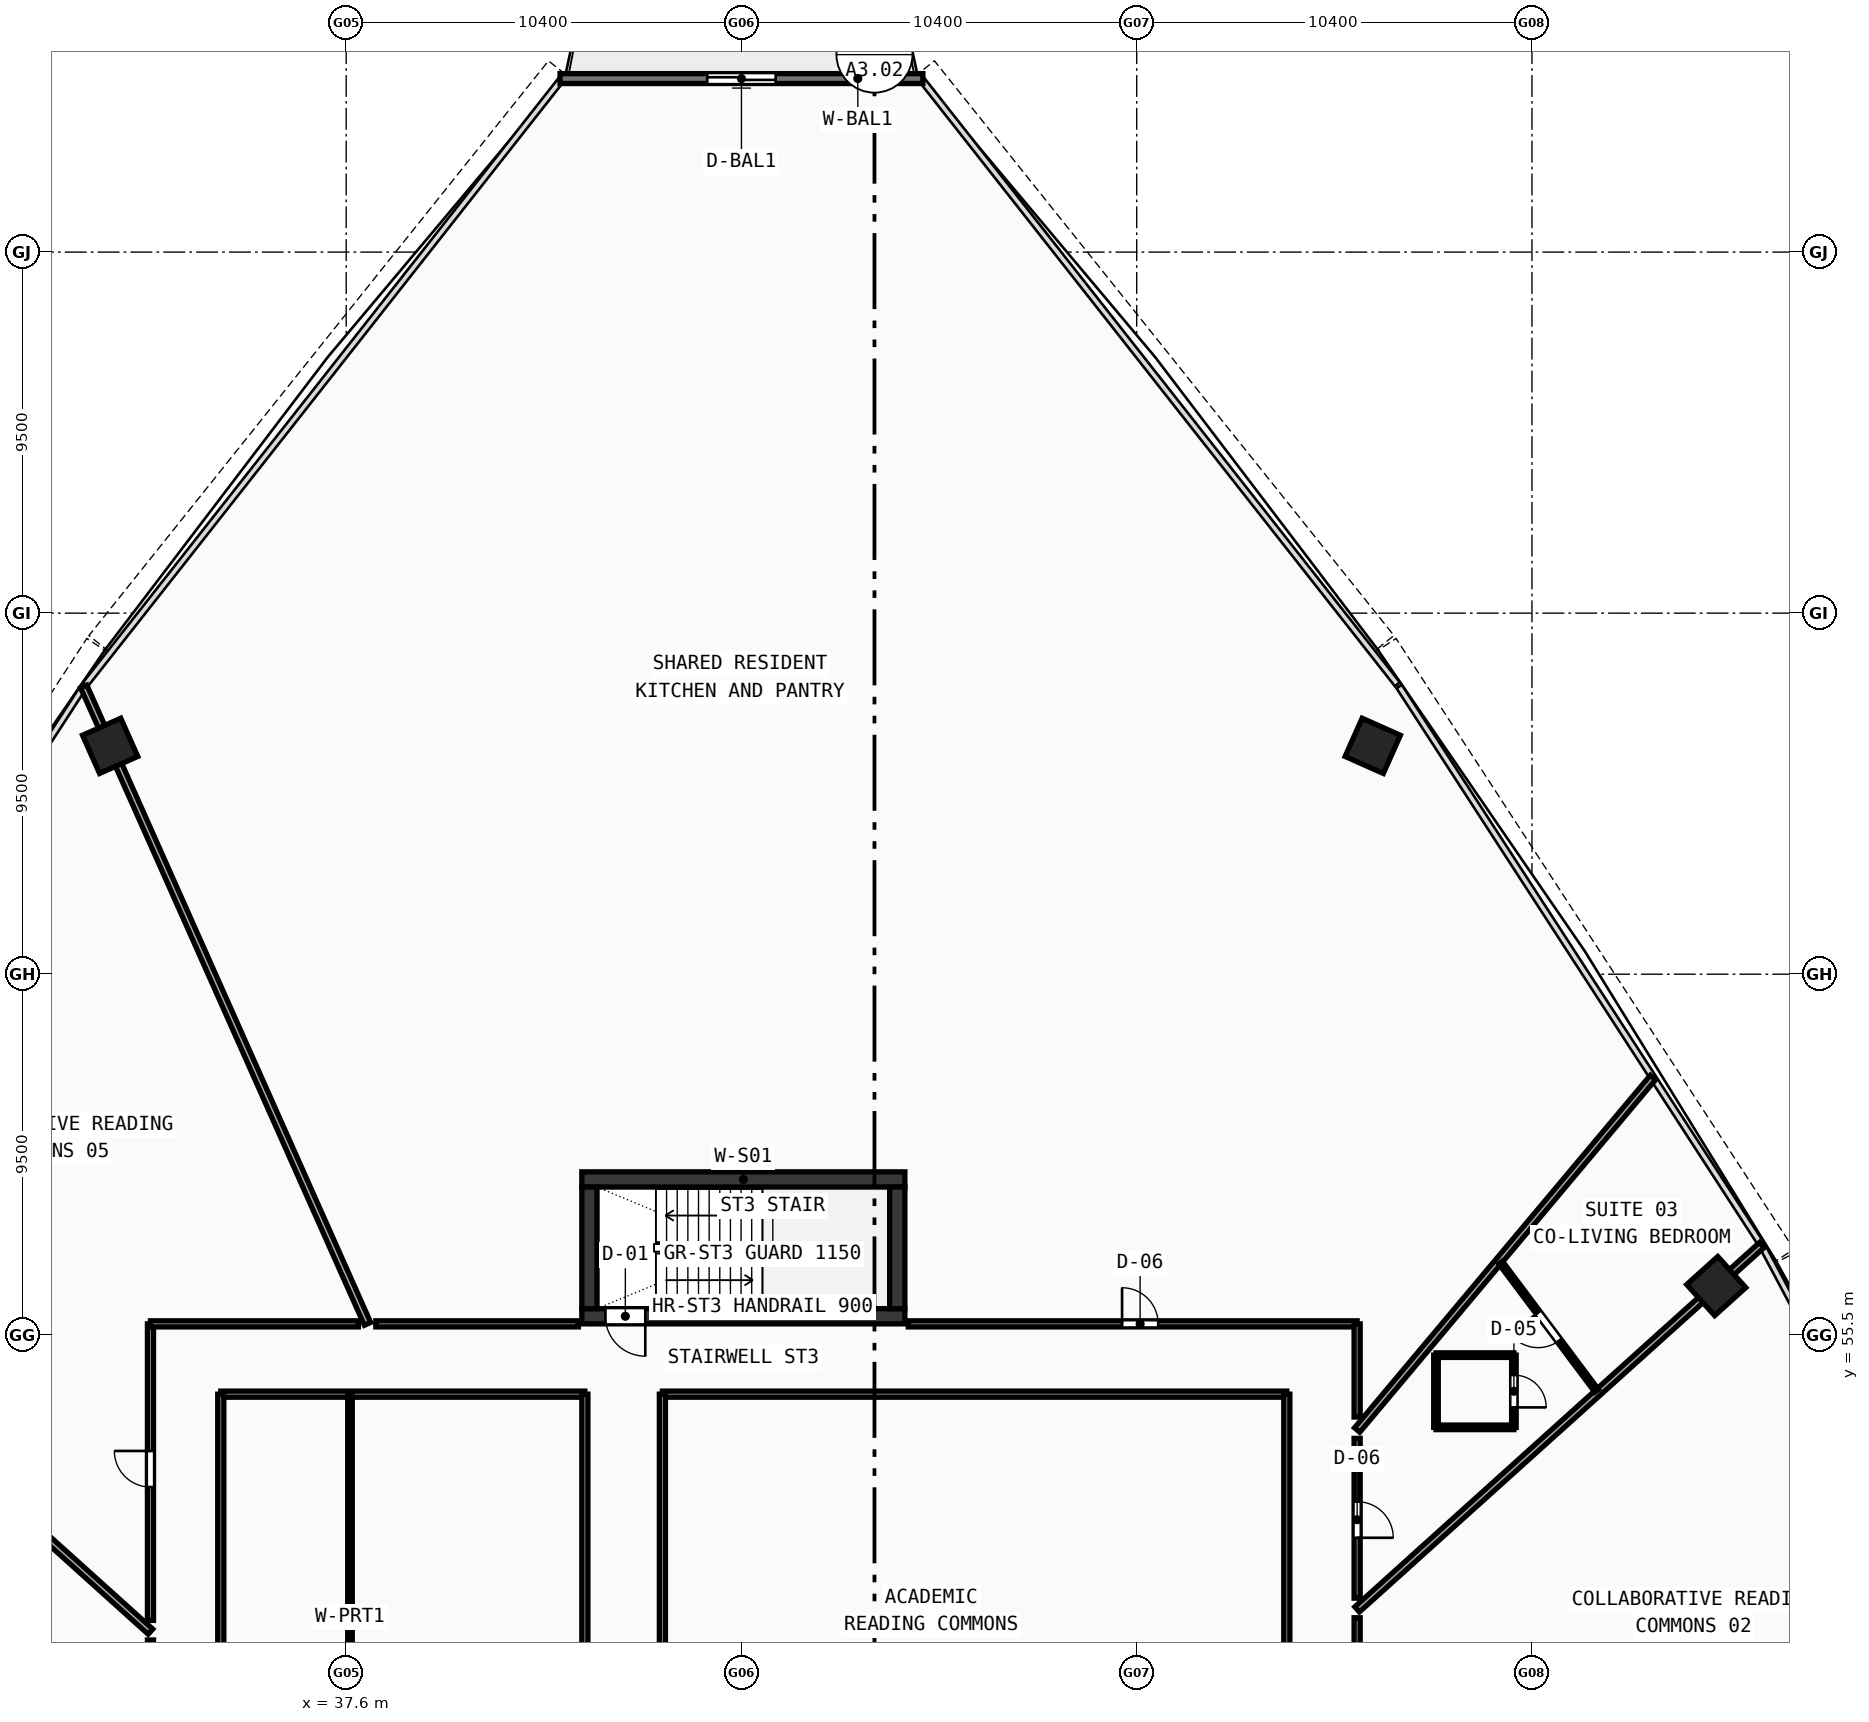
"""IFC4 building model, lengths in metres.
Left out: names, types, materials, properties, quantities, classifications, styles, units other than length and angle.
Written with IfcOpenShell. Run it as: python <this file> out.ifc"""

import sys

from ifc_helpers import new_model, si_unit, direction, frame, frame_2d, origin, origin_with_axes, origin_2d, place, context, subcontext, project, spatial, rectangle, hollow_rectangle, extrude, source, transform, mapped, element, fill, save


model = new_model("IFC4")
c1 = context("Model", 3, precision=1e-05, world=origin(), true_north=direction((0.0, 1.0)))
c2 = subcontext(c1, "Body", "Model", "MODEL_VIEW")
j1 = project(units=[si_unit("LENGTHUNIT", "METRE"), si_unit("PLANEANGLEUNIT", "RADIAN")], contexts=[c1])
p1 = place(None, origin())
s1 = spatial("IfcSite", under=j1, at=p1, CompositionType="ELEMENT")
p2 = place(p1, origin())
s2 = spatial("IfcBuilding", under=s1, at=p2, CompositionType="ELEMENT")
p3 = place(p2, frame((0.0, 0.0, 48.55)))
s3 = spatial("IfcBuildingStorey", under=s2, at=p3, CompositionType="ELEMENT", Elevation=48.55)
p4 = place(p3, frame((43.8, 59.6, 0.0), z_axis=(0.0, 0.0, 1.0), x_axis=(1.0, 0.0, 0.0)))
e1 = element("IfcWall", 1, at=p4, inside=s3, PredefinedType="SHEAR", context=c2, shape_type="SweptSolid", body=[
    extrude(rectangle(XDim=8.5, YDim=0.4, at=frame_2d((4.25, 0.0))), origin(), (0.0, 0.0, 1.0), 3.37),
])
p5 = place(p3, frame((43.8, 56.0, 0.0), z_axis=(0.0, 0.0, 1.0), x_axis=(1.0, 0.0, 0.0)))
e2 = element("IfcWall", 2, at=p5, inside=s3, PredefinedType="SHEAR", context=c2, shape_type="SweptSolid", body=[
    extrude(rectangle(XDim=8.5, YDim=0.4, at=frame_2d((4.25, 0.0))), origin(), (0.0, 0.0, 1.0), 3.37),
])
p6 = place(p5, frame((0.62, 0.0, 0.0)))
e3 = element("IfcOpeningElement", 3, at=p6, cuts=e2, PredefinedType="OPENING", context=c2, shape_type="SweptSolid", body=[
    extrude(rectangle(XDim=1.05, YDim=2.1, at=frame_2d((0.525, 1.05))), frame((0.0, 0.21, 0.0), z_axis=(0.0, -1.0, 0.0), x_axis=(1.0, 0.0, 0.0)), (0.0, 0.0, 1.0), 0.42),
])
for number, where, z_axis, x_axis in (
    (4, (44.0, 56.2, 0.0), (0.0, 0.0, 1.0), (0.0, 1.0, 0.0)),
    (5, (52.1, 56.2, 0.0), (0.0, 0.0, 1.0), (0.0, 1.0, 0.0)),
):
    element("IfcWall", number, at=place(p3, frame(where, z_axis=z_axis, x_axis=x_axis)), inside=s3, PredefinedType="SHEAR", context=c2, shape_type="SweptSolid", body=[
        extrude(rectangle(XDim=3.2, YDim=0.4, at=frame_2d((1.6, 0.0))), origin(), (0.0, 0.0, 1.0), 3.37),
    ])
m1 = source(origin(), c2, "Body", "SweptSolid", [
    extrude(hollow_rectangle(XDim=1.1, YDim=1.1, WallThickness=0.045, at=origin_2d()), origin(), (0.0, 0.0, 1.0), 3.63),
])
for number, where, z_axis, x_axis in (
    (6, (73.649, 56.794, -0.26), (0.0, 0.0, 1.0), (-0.669, 0.743, 0.0)),
    (7, (64.611, 71.009, -0.26), (0.0, 0.0, 1.0), (-0.914, 0.407, 0.0)),
    (8, (31.389, 71.009, -0.26), (0.0, 0.0, 1.0), (-0.914, -0.407, 0.0)),
):
    element("IfcColumn", number, at=place(p3, frame(where, z_axis=z_axis, x_axis=x_axis)), inside=s3, PredefinedType="COLUMN", context=c2, shape_type="MappedRepresentation", body=[
        mapped(m1, transform((0.0, 0.0, 0.0), scale=1.0)),
    ])
p7 = place(p3, frame((52.773, 88.566, 0.0), z_axis=(0.0, 0.0, 1.0), x_axis=(-1.0, 0.0, 0.0)))
e9 = element("IfcWall", 9, at=p7, inside=s3, PredefinedType="STANDARD", context=c2, shape_type="SweptSolid", body=[
    extrude(rectangle(XDim=9.546, YDim=0.26, at=frame_2d((4.773, 0.0))), origin(), (0.0, 0.0, 1.0), 3.37),
])
p8 = place(p7, frame((3.873, 0.0, 0.0)))
e10 = element("IfcOpeningElement", 10, at=p8, cuts=e9, PredefinedType="OPENING", context=c2, shape_type="SweptSolid", body=[
    extrude(rectangle(XDim=1.8, YDim=2.15, at=frame_2d((0.9, 1.075))), frame((0.0, 0.14, 0.0), z_axis=(0.0, -1.0, 0.0), x_axis=(1.0, 0.0, 0.0)), (0.0, 0.0, 1.0), 0.28),
])
p9 = place(p3, frame((34.3, 53.95, 0.0), z_axis=(0.0, 0.0, 1.0), x_axis=(1.0, 0.0, 0.0)))
e11 = element("IfcWall", 11, at=p9, inside=s3, PredefinedType="PARTITIONING", context=c2, shape_type="SweptSolid", body=[
    extrude(rectangle(XDim=9.58, YDim=0.16, at=frame_2d((4.79, 0.0))), origin(), (0.0, 0.0, 1.0), 2.67),
])
for number, where, z_axis, x_axis in (
    (12, (34.3, 42.25, 0.0), (0.0, 0.0, 1.0), (0.0, 1.0, 0.0)),
    (13, (43.88, 42.25, 0.0), (0.0, 0.0, 1.0), (0.0, 1.0, 0.0)),
):
    element("IfcWall", number, at=place(p3, frame(where, z_axis=z_axis, x_axis=x_axis)), inside=s3, PredefinedType="PARTITIONING", context=c2, shape_type="SweptSolid", body=[
        extrude(rectangle(XDim=11.7, YDim=0.16, at=frame_2d((5.85, 0.0))), origin(), (0.0, 0.0, 1.0), 2.67),
    ])
p10 = place(p3, frame((37.7, 42.25, 0.0), z_axis=(0.0, 0.0, 1.0), x_axis=(0.0, 1.0, 0.0)))
e14 = element("IfcWall", 14, at=p10, inside=s3, PredefinedType="PARTITIONING", context=c2, shape_type="SweptSolid", body=[
    extrude(rectangle(XDim=11.7, YDim=0.12, at=frame_2d((5.85, 0.0))), origin(), (0.0, 0.0, 1.0), 2.67),
])
p11 = place(p3, frame((45.92, 53.95, 0.0), z_axis=(0.0, 0.0, 1.0), x_axis=(1.0, 0.0, 0.0)))
e15 = element("IfcWall", 15, at=p11, inside=s3, PredefinedType="PARTITIONING", context=c2, shape_type="SweptSolid", body=[
    extrude(rectangle(XDim=16.43, YDim=0.16, at=frame_2d((8.215, 0.0))), origin(), (0.0, 0.0, 1.0), 2.67),
])
p12 = place(p3, frame((45.92, 42.25, 0.0), z_axis=(0.0, 0.0, 1.0), x_axis=(0.0, 1.0, 0.0)))
e16 = element("IfcWall", 16, at=p12, inside=s3, PredefinedType="PARTITIONING", context=c2, shape_type="SweptSolid", body=[
    extrude(rectangle(XDim=11.7, YDim=0.16, at=frame_2d((5.85, 0.0))), origin(), (0.0, 0.0, 1.0), 2.97),
])
p13 = place(p3, frame((62.35, 42.25, 0.0), z_axis=(0.0, 0.0, 1.0), x_axis=(0.0, 1.0, 0.0)))
e17 = element("IfcWall", 17, at=p13, inside=s3, PredefinedType="PARTITIONING", context=c2, shape_type="SweptSolid", body=[
    extrude(rectangle(XDim=11.7, YDim=0.16, at=frame_2d((5.85, 0.0))), origin(), (0.0, 0.0, 1.0), 2.67),
])
p14 = place(p3, frame((64.2, 48.287, 0.0), z_axis=(0.0, 0.0, 1.0), x_axis=(0.743156867614, 0.669117231969, 0.0)))
e18 = element("IfcWall", 18, at=p14, inside=s3, PredefinedType="PARTITIONING", context=c2, shape_type="SweptSolid", body=[
    extrude(rectangle(XDim=14.327, YDim=0.18, at=frame_2d((7.164, 0.0))), origin(), (0.0, 0.0, 1.0), 2.67),
])
p15 = place(p3, frame((64.2, 53.006, 0.0), z_axis=(0.0, 0.0, 1.0), x_axis=(0.642786334534, 0.766045513098, 0.0)))
e19 = element("IfcWall", 19, at=p15, inside=s3, PredefinedType="PARTITIONING", context=c2, shape_type="SweptSolid", body=[
    extrude(rectangle(XDim=12.11, YDim=0.18, at=frame_2d((6.055, 0.0))), origin(), (0.0, 0.0, 1.0), 2.67),
])
p16 = place(p3, frame((38.16, 55.8, 0.0), z_axis=(0.0, 0.0, 1.0), x_axis=(-0.406730734994, 0.913548088067, 0.0)))
e20 = element("IfcWall", 20, at=p16, inside=s3, PredefinedType="PARTITIONING", context=c2, shape_type="SweptSolid", body=[
    extrude(rectangle(XDim=18.356, YDim=0.18, at=frame_2d((9.178, 0.0))), origin(), (0.0, 0.0, 1.0), 2.67),
])
p17 = place(p3, frame((32.45, 47.701, 0.0), z_axis=(0.0, 0.0, 1.0), x_axis=(-0.743155181141, 0.66911910505, 0.0)))
e21 = element("IfcWall", 21, at=p17, inside=s3, PredefinedType="PARTITIONING", context=c2, shape_type="SweptSolid", body=[
    extrude(rectangle(XDim=15.202, YDim=0.18, at=frame_2d((7.601, 0.0))), origin(), (0.0, 0.0, 1.0), 2.67),
])
p18 = place(p3, frame((32.45, 38.984, 0.0), z_axis=(0.0, 0.0, 1.0), x_axis=(0.0, 1.0, 0.0)))
e22 = element("IfcWall", 22, at=p18, inside=s3, PredefinedType="PARTITIONING", context=c2, shape_type="SweptSolid", body=[
    extrude(rectangle(XDim=8.498, YDim=0.16, at=frame_2d((4.249, 0.0))), origin(), (0.0, 0.0, 1.0), 2.67),
])
p19 = place(p18, frame((3.768, 0.0, 0.0)))
e23 = element("IfcOpeningElement", 23, at=p19, cuts=e22, PredefinedType="OPENING", context=c2, shape_type="SweptSolid", body=[
    extrude(rectangle(XDim=0.95, YDim=2.1, at=frame_2d((0.475, 1.05))), frame((0.0, 0.09, 0.0), z_axis=(0.0, -1.0, 0.0), x_axis=(1.0, 0.0, 0.0)), (0.0, 0.0, 1.0), 0.18),
])
p20 = place(p3, frame((32.45, 47.997, 0.0), z_axis=(0.0, 0.0, 1.0), x_axis=(0.0, 1.0, 0.0)))
e24 = element("IfcWall", 24, at=p20, inside=s3, PredefinedType="PARTITIONING", context=c2, shape_type="SweptSolid", body=[
    extrude(rectangle(XDim=7.803, YDim=0.16, at=frame_2d((3.901, 0.0))), origin(), (0.0, 0.0, 1.0), 3.37),
])
p21 = place(p20, frame((3.508, 0.0, 0.0)))
e25 = element("IfcOpeningElement", 25, at=p21, cuts=e24, PredefinedType="OPENING", context=c2, shape_type="SweptSolid", body=[
    extrude(rectangle(XDim=0.95, YDim=2.1, at=frame_2d((0.475, 1.05))), frame((0.0, 0.09, 0.0), z_axis=(0.0, -1.0, 0.0), x_axis=(1.0, 0.0, 0.0)), (0.0, 0.0, 1.0), 0.18),
])
p22 = place(p3, frame((32.45, 55.8, 0.0), z_axis=(0.0, 0.0, 1.0), x_axis=(1.0, 0.0, 0.0)))
e26 = element("IfcWall", 26, at=p22, inside=s3, PredefinedType="PARTITIONING", context=c2, shape_type="SweptSolid", body=[
    extrude(rectangle(XDim=5.47, YDim=0.16, at=frame_2d((2.735, 0.0))), origin(), (0.0, 0.0, 1.0), 3.37),
])
p23 = place(p3, frame((38.38, 55.8, 0.0), z_axis=(0.0, 0.0, 1.0), x_axis=(1.0, 0.0, 0.0)))
e27 = element("IfcWall", 27, at=p23, inside=s3, PredefinedType="PARTITIONING", context=c2, shape_type="SweptSolid", body=[
    extrude(rectangle(XDim=5.329, YDim=0.16, at=frame_2d((2.665, 0.0))), origin(), (0.0, 0.0, 1.0), 2.67),
])
p24 = place(p3, frame((52.391, 55.8, 0.0), z_axis=(0.0, 0.0, 1.0), x_axis=(1.0, 0.0, 0.0)))
e28 = element("IfcWall", 28, at=p24, inside=s3, PredefinedType="PARTITIONING", context=c2, shape_type="SweptSolid", body=[
    extrude(rectangle(XDim=11.809, YDim=0.16, at=frame_2d((5.904, 0.0))), origin(), (0.0, 0.0, 1.0), 2.67),
])
p25 = place(p24, frame((5.624, 0.0, 0.0)))
e29 = element("IfcOpeningElement", 29, at=p25, cuts=e28, PredefinedType="OPENING", context=c2, shape_type="SweptSolid", body=[
    extrude(rectangle(XDim=0.95, YDim=2.1, at=frame_2d((0.475, 1.05))), frame((0.0, 0.09, 0.0), z_axis=(0.0, -1.0, 0.0), x_axis=(1.0, 0.0, 0.0)), (0.0, 0.0, 1.0), 0.18),
])
p26 = place(p3, frame((64.2, 55.8, 0.0), z_axis=(0.0, 0.0, 1.0), x_axis=(0.0, -1.0, 0.0)))
e30 = element("IfcWall", 30, at=p26, inside=s3, PredefinedType="PARTITIONING", context=c2, shape_type="SweptSolid", body=[
    extrude(rectangle(XDim=2.451, YDim=0.16, at=frame_2d((1.226, 0.0))), origin(), (0.0, 0.0, 1.0), 2.97),
])
p27 = place(p3, frame((64.2, 52.787, 0.0), z_axis=(0.0, 0.0, 1.0), x_axis=(0.0, -1.0, 0.0)))
e31 = element("IfcWall", 31, at=p27, inside=s3, PredefinedType="PARTITIONING", context=c2, shape_type="SweptSolid", body=[
    extrude(rectangle(XDim=4.204, YDim=0.16, at=frame_2d((2.102, 0.0))), origin(), (0.0, 0.0, 1.0), 3.37),
])
p28 = place(p27, frame((1.665, 0.0, 0.0)))
e32 = element("IfcOpeningElement", 32, at=p28, cuts=e31, PredefinedType="OPENING", context=c2, shape_type="SweptSolid", body=[
    extrude(rectangle(XDim=0.95, YDim=2.1, at=frame_2d((0.475, 1.05))), frame((0.0, 0.09, 0.0), z_axis=(0.0, -1.0, 0.0), x_axis=(1.0, 0.0, 0.0)), (0.0, 0.0, 1.0), 0.18),
])
p29 = place(p3, frame((64.2, 48.067, 0.0), z_axis=(0.0, 0.0, 1.0), x_axis=(0.0, -1.0, 0.0)))
e33 = element("IfcWall", 33, at=p29, inside=s3, PredefinedType="PARTITIONING", context=c2, shape_type="SweptSolid", body=[
    extrude(rectangle(XDim=8.872, YDim=0.16, at=frame_2d((4.436, 0.0))), origin(), (0.0, 0.0, 1.0), 2.67),
])
p30 = place(p29, frame((3.967, 0.0, 0.0)))
e34 = element("IfcOpeningElement", 34, at=p30, cuts=e33, PredefinedType="OPENING", context=c2, shape_type="SweptSolid", body=[
    extrude(rectangle(XDim=0.95, YDim=2.1, at=frame_2d((0.475, 1.05))), frame((0.0, 0.09, 0.0), z_axis=(0.0, -1.0, 0.0), x_axis=(1.0, 0.0, 0.0)), (0.0, 0.0, 1.0), 0.18),
])
p31 = place(p3, frame((66.275, 53.077, 0.0), z_axis=(0.0, 0.0, 1.0), x_axis=(1.0, 0.0, 0.0)))
e35 = element("IfcWall", 35, at=p31, inside=s3, PredefinedType="PARTITIONING", context=c2, shape_type="SweptSolid", body=[
    extrude(rectangle(XDim=2.05, YDim=0.12, at=frame_2d((1.025, 0.0))), origin(), (0.0, 0.0, 1.0), 2.97),
])
p32 = place(p3, frame((68.325, 53.077, 0.0), z_axis=(0.0, 0.0, 1.0), x_axis=(0.0, 1.0, 0.0)))
e36 = element("IfcWall", 36, at=p32, inside=s3, PredefinedType="PARTITIONING", context=c2, shape_type="SweptSolid", body=[
    extrude(rectangle(XDim=1.9, YDim=0.12, at=frame_2d((0.95, 0.0))), origin(), (0.0, 0.0, 1.0), 3.37),
])
p33 = place(p32, frame((0.525, 0.0, 0.0)))
e37 = element("IfcOpeningElement", 37, at=p33, cuts=e36, PredefinedType="OPENING", context=c2, shape_type="SweptSolid", body=[
    extrude(rectangle(XDim=0.85, YDim=2.1, at=frame_2d((0.425, 1.05))), frame((0.0, 0.07, 0.0), z_axis=(0.0, -1.0, 0.0), x_axis=(1.0, 0.0, 0.0)), (0.0, 0.0, 1.0), 0.14),
])
p34 = place(p3, frame((68.325, 54.977, 0.0), z_axis=(0.0, 0.0, 1.0), x_axis=(-1.0, 0.0, 0.0)))
e38 = element("IfcWall", 38, at=p34, inside=s3, PredefinedType="PARTITIONING", context=c2, shape_type="SweptSolid", body=[
    extrude(rectangle(XDim=2.05, YDim=0.12, at=frame_2d((1.025, 0.0))), origin(), (0.0, 0.0, 1.0), 3.37),
])
p35 = place(p3, frame((66.275, 54.977, 0.0), z_axis=(0.0, 0.0, 1.0), x_axis=(0.0, -1.0, 0.0)))
e39 = element("IfcWall", 39, at=p35, inside=s3, PredefinedType="PARTITIONING", context=c2, shape_type="SweptSolid", body=[
    extrude(rectangle(XDim=1.9, YDim=0.12, at=frame_2d((0.95, 0.0))), origin(), (0.0, 0.0, 1.0), 2.97),
])
p36 = place(p3, frame((70.501, 54.04, 0.0), z_axis=(0.0, 0.0, 1.0), x_axis=(-0.599443526822, 0.800417052636, 0.0)))
e40 = element("IfcWall", 40, at=p36, inside=s3, PredefinedType="PARTITIONING", context=c2, shape_type="SweptSolid", body=[
    extrude(rectangle(XDim=4.213, YDim=0.12, at=frame_2d((2.106, 0.0))), origin(), (0.0, 0.0, 1.0), 2.67),
])
p37 = place(p36, frame((1.646, 0.0, 0.0)))
e41 = element("IfcOpeningElement", 41, at=p37, cuts=e40, PredefinedType="OPENING", context=c2, shape_type="SweptSolid", body=[
    extrude(rectangle(XDim=0.92, YDim=2.1, at=frame_2d((0.46, 1.05))), frame((0.0, 0.07, 0.0), z_axis=(0.0, -1.0, 0.0), x_axis=(1.0, 0.0, 0.0)), (0.0, 0.0, 1.0), 0.14),
])
m2 = source(origin(), c2, "Body", "SweptSolid", [
    extrude(rectangle(XDim=1.8, YDim=2.15, at=frame_2d((0.9, 1.075))), frame((0.0, 0.025, 0.0), z_axis=(0.0, -1.0, 0.0), x_axis=(1.0, 0.0, 0.0)), (0.0, 0.0, 1.0), 0.05),
])
p38 = place(p8, origin_with_axes())
e42 = element("IfcDoor", 42, at=p38, inside=s3, OperationType="DOUBLE_DOOR_SLIDING", PredefinedType="DOOR", context=c2, shape_type="MappedRepresentation", body=[
    mapped(m2, transform((0.0, 0.0, 0.0), scale=1.0)),
])
fill(e10, e42)
m3 = source(origin(), c2, "Body", "SweptSolid", [
    extrude(rectangle(XDim=1.05, YDim=2.1, at=frame_2d((0.525, 1.05))), frame((0.0, 0.025, 0.0), z_axis=(0.0, -1.0, 0.0), x_axis=(1.0, 0.0, 0.0)), (0.0, 0.0, 1.0), 0.05),
])
p39 = place(p6, frame((1.05, 0.0, 0.0), z_axis=(0.0, 0.0, 1.0), x_axis=(-1.0, 0.0, 0.0)))
e43 = element("IfcDoor", 43, at=p39, inside=s3, OperationType="SINGLE_SWING_LEFT", PredefinedType="DOOR", context=c2, shape_type="MappedRepresentation", body=[
    mapped(m3, transform((0.0, 0.0, 0.0), scale=1.0)),
])
fill(e3, e43)
m4 = source(origin(), c2, "Body", "SweptSolid", [
    extrude(rectangle(XDim=0.95, YDim=2.1, at=frame_2d((0.475, 1.05))), frame((0.0, 0.025, 0.0), z_axis=(0.0, -1.0, 0.0), x_axis=(1.0, 0.0, 0.0)), (0.0, 0.0, 1.0), 0.05),
])
p40 = place(p28, origin_with_axes())
e44 = element("IfcDoor", 44, at=p40, inside=s3, OperationType="SINGLE_SWING_RIGHT", PredefinedType="DOOR", context=c2, shape_type="MappedRepresentation", body=[
    mapped(m4, transform((0.0, 0.0, 0.0), scale=1.0)),
])
fill(e32, e44)
m5 = source(origin(), c2, "Body", "SweptSolid", [
    extrude(rectangle(XDim=0.85, YDim=2.1, at=frame_2d((0.425, 1.05))), frame((0.0, 0.025, 0.0), z_axis=(0.0, -1.0, 0.0), x_axis=(1.0, 0.0, 0.0)), (0.0, 0.0, 1.0), 0.05),
])
p41 = place(p33, frame((0.85, 0.0, 0.0), z_axis=(0.0, 0.0, 1.0), x_axis=(-1.0, 0.0, 0.0)))
e45 = element("IfcDoor", 45, at=p41, inside=s3, OperationType="SINGLE_SWING_RIGHT", PredefinedType="DOOR", context=c2, shape_type="MappedRepresentation", body=[
    mapped(m5, transform((0.0, 0.0, 0.0), scale=1.0)),
])
fill(e37, e45)
m6 = source(origin(), c2, "Body", "SweptSolid", [
    extrude(rectangle(XDim=0.92, YDim=2.1, at=frame_2d((0.46, 1.05))), frame((0.0, 0.025, 0.0), z_axis=(0.0, -1.0, 0.0), x_axis=(1.0, 0.0, 0.0)), (0.0, 0.0, 1.0), 0.05),
])
p42 = place(p37, origin_with_axes())
e46 = element("IfcDoor", 46, at=p42, inside=s3, OperationType="SINGLE_SWING_RIGHT", PredefinedType="DOOR", context=c2, shape_type="MappedRepresentation", body=[
    mapped(m6, transform((0.0, 0.0, 0.0), scale=1.0)),
])
fill(e41, e46)
p43 = place(p25, origin_with_axes())
e47 = element("IfcDoor", 47, at=p43, inside=s3, OperationType="SINGLE_SWING_LEFT", PredefinedType="DOOR", context=c2, shape_type="MappedRepresentation", body=[
    mapped(m4, transform((0.0, 0.0, 0.0), scale=1.0)),
])
fill(e29, e47)
p44 = place(p21, origin_with_axes())
e48 = element("IfcDoor", 48, at=p44, inside=s3, OperationType="SINGLE_SWING_RIGHT", PredefinedType="DOOR", context=c2, shape_type="MappedRepresentation", body=[
    mapped(m4, transform((0.0, 0.0, 0.0), scale=1.0)),
])
fill(e25, e48)
save(model, sys.argv[1])
